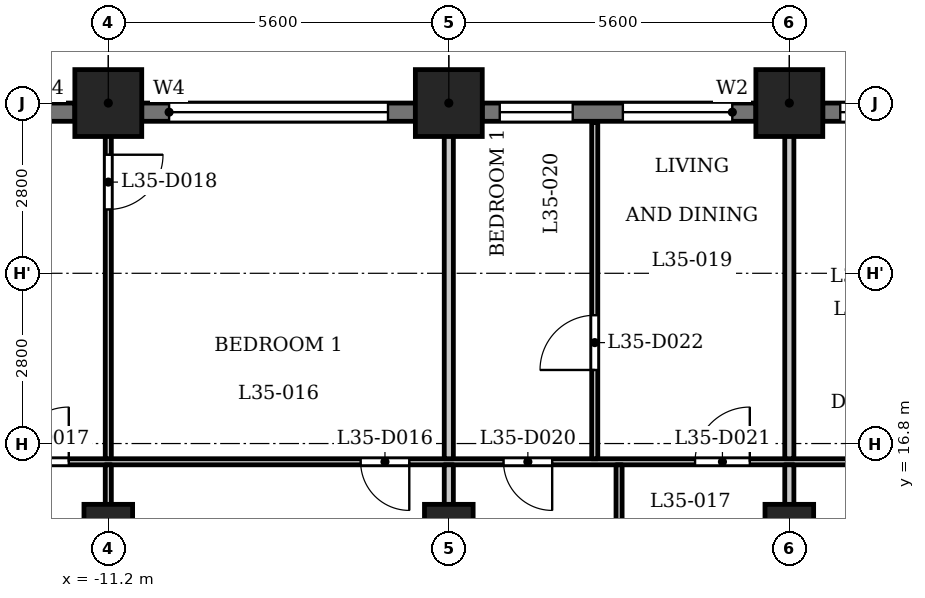
"""IFC4 building model, lengths in metres.
Left out: names, types, materials, properties, quantities, classifications, styles, units other than length and angle.
Written with IfcOpenShell. Run it as: python <this file> out.ifc"""

import sys

from ifc_helpers import new_model, si_unit, direction, frame, frame_2d, origin, origin_2d, place, context, subcontext, project, spatial, rectangle, extrude, element, fill, save


model = new_model("IFC4")
c1 = context("Model", 3, precision=1e-05, world=origin(), true_north=direction((0.0, 1.0)))
c2 = subcontext(c1, "Body", "Model", "MODEL_VIEW")
j1 = project(units=[si_unit("LENGTHUNIT", "METRE"), si_unit("PLANEANGLEUNIT", "RADIAN")], contexts=[c1])
p1 = place(None, origin())
s1 = spatial("IfcSite", under=j1, at=p1, CompositionType="ELEMENT")
p2 = place(p1, origin())
s2 = spatial("IfcBuilding", under=s1, at=p2, CompositionType="ELEMENT")
p3 = place(p2, frame((0.0, 0.0, 139.6)))
s3 = spatial("IfcBuildingStorey", under=s2, at=p3, CompositionType="ELEMENT", Elevation=139.6)
for number, where, z_axis, x_axis in (
    (1, (0.0, 22.4, 0.0), (0.0, 0.0, 1.0), (1.0, 0.0, 0.0)),
    (2, (-5.6, 22.4, 0.0), (0.0, 0.0, 1.0), (1.0, 0.0, 0.0)),
    (3, (-11.2, 22.4, 0.0), (0.0, 0.0, 1.0), (1.0, 0.0, 0.0)),
):
    element("IfcColumn", number, at=place(p3, frame(where, z_axis=z_axis, x_axis=x_axis)), inside=s3, PredefinedType="COLUMN", context=c2, shape_type="SweptSolid", body=[
        extrude(rectangle(XDim=1.1, YDim=1.1, at=origin_2d()), origin(), (0.0, 0.0, 1.0), 3.5),
    ])
for number, where, z_axis, x_axis in (
    (4, (-11.2, 15.4, 0.0), (0.0, 0.0, 1.0), (1.0, 0.0, 0.0)),
    (5, (-5.6, 15.4, 0.0), (0.0, 0.0, 1.0), (1.0, 0.0, 0.0)),
    (6, (0.0, 15.4, 0.0), (0.0, 0.0, 1.0), (1.0, 0.0, 0.0)),
):
    element("IfcColumn", number, at=place(p3, frame(where, z_axis=z_axis, x_axis=x_axis)), inside=s3, PredefinedType="COLUMN", context=c2, shape_type="SweptSolid", body=[
        extrude(rectangle(XDim=0.8, YDim=0.8, at=origin_2d()), origin(), (0.0, 0.0, 1.0), 3.5),
    ])
p4 = place(p3, frame((5.05, 22.25, 0.0), z_axis=(0.0, 0.0, 1.0), x_axis=(-1.0, 0.0, 0.0)))
e7 = element("IfcWall", 7, at=p4, inside=s3, PredefinedType="SOLIDWALL", context=c2, shape_type="SweptSolid", body=[
    extrude(rectangle(XDim=4.5, YDim=0.3, at=frame_2d((2.25, 0.0))), origin(), (0.0, 0.0, 1.0), 2.45),
])
p5 = place(p4, frame((0.387, 0.0, 0.6)))
e8 = element("IfcOpeningElement", 8, at=p5, cuts=e7, PredefinedType="OPENING", context=c2, shape_type="SweptSolid", body=[
    extrude(rectangle(XDim=1.2, YDim=1.55, at=frame_2d((0.6, 0.775))), frame((0.0, 0.16, 0.0), z_axis=(0.0, -1.0, 0.0), x_axis=(1.0, 0.0, 0.0)), (0.0, 0.0, 1.0), 0.32),
])
p6 = place(p4, frame((2.413, 0.0, 0.9)))
e9 = element("IfcOpeningElement", 9, at=p6, cuts=e7, PredefinedType="OPENING", context=c2, shape_type="SweptSolid", body=[
    extrude(rectangle(XDim=1.8, YDim=1.25, at=frame_2d((0.9, 0.625))), frame((0.0, 0.16, 0.0), z_axis=(0.0, -1.0, 0.0), x_axis=(1.0, 0.0, 0.0)), (0.0, 0.0, 1.0), 0.32),
])
p7 = place(p3, frame((-0.55, 22.25, 0.0), z_axis=(0.0, 0.0, 1.0), x_axis=(-1.0, 0.0, 0.0)))
e10 = element("IfcWall", 10, at=p7, inside=s3, PredefinedType="SOLIDWALL", context=c2, shape_type="SweptSolid", body=[
    extrude(rectangle(XDim=4.5, YDim=0.3, at=frame_2d((2.25, 0.0))), origin(), (0.0, 0.0, 1.0), 2.45),
])
p8 = place(p7, frame((0.387, 0.0, 0.9)))
e11 = element("IfcOpeningElement", 11, at=p8, cuts=e10, PredefinedType="OPENING", context=c2, shape_type="SweptSolid", body=[
    extrude(rectangle(XDim=1.8, YDim=1.25, at=frame_2d((0.9, 0.625))), frame((0.0, 0.16, 0.0), z_axis=(0.0, -1.0, 0.0), x_axis=(1.0, 0.0, 0.0)), (0.0, 0.0, 1.0), 0.32),
])
p9 = place(p7, frame((3.012, 0.0, 0.6)))
e12 = element("IfcOpeningElement", 12, at=p9, cuts=e10, PredefinedType="OPENING", context=c2, shape_type="SweptSolid", body=[
    extrude(rectangle(XDim=1.2, YDim=1.55, at=frame_2d((0.6, 0.775))), frame((0.0, 0.16, 0.0), z_axis=(0.0, -1.0, 0.0), x_axis=(1.0, 0.0, 0.0)), (0.0, 0.0, 1.0), 0.32),
])
p10 = place(p3, frame((-6.15, 22.25, 0.0), z_axis=(0.0, 0.0, 1.0), x_axis=(-1.0, 0.0, 0.0)))
e13 = element("IfcWall", 13, at=p10, inside=s3, PredefinedType="SOLIDWALL", context=c2, shape_type="SweptSolid", body=[
    extrude(rectangle(XDim=4.5, YDim=0.3, at=frame_2d((2.25, 0.0))), origin(), (0.0, 0.0, 1.0), 2.45),
])
p11 = place(p10, frame((0.45, 0.0, 1.2)))
e14 = element("IfcOpeningElement", 14, at=p11, cuts=e13, PredefinedType="OPENING", context=c2, shape_type="SweptSolid", body=[
    extrude(rectangle(XDim=3.6, YDim=0.95, at=frame_2d((1.8, 0.475))), frame((0.0, 0.16, 0.0), z_axis=(0.0, -1.0, 0.0), x_axis=(1.0, 0.0, 0.0)), (0.0, 0.0, 1.0), 0.32),
])
p12 = place(p3, frame((-11.75, 22.25, 0.0), z_axis=(0.0, 0.0, 1.0), x_axis=(-1.0, 0.0, 0.0)))
e15 = element("IfcWall", 15, at=p12, inside=s3, PredefinedType="SOLIDWALL", context=c2, shape_type="SweptSolid", body=[
    extrude(rectangle(XDim=4.5, YDim=0.3, at=frame_2d((2.25, 0.0))), origin(), (0.0, 0.0, 1.0), 2.45),
])
p13 = place(p12, frame((0.45, 0.0, 1.2)))
e16 = element("IfcOpeningElement", 16, at=p13, cuts=e15, PredefinedType="OPENING", context=c2, shape_type="SweptSolid", body=[
    extrude(rectangle(XDim=3.6, YDim=0.95, at=frame_2d((1.8, 0.475))), frame((0.0, 0.16, 0.0), z_axis=(0.0, -1.0, 0.0), x_axis=(1.0, 0.0, 0.0)), (0.0, 0.0, 1.0), 0.32),
])
p14 = place(p3, frame((-16.725, 16.5, 0.0), z_axis=(0.0, 0.0, 1.0), x_axis=(1.0, 0.0, 0.0)))
e17 = element("IfcWall", 17, at=p14, inside=s3, PredefinedType="PARTITIONING", context=c2, shape_type="SweptSolid", body=[
    extrude(rectangle(XDim=33.45, YDim=0.1, at=frame_2d((16.725, 0.0))), origin(), (0.0, 0.0, 1.0), 3.2),
])
p15 = place(p14, frame((9.675, 0.0, 0.0)))
e18 = element("IfcOpeningElement", 18, at=p15, cuts=e17, PredefinedType="OPENING", context=c2, shape_type="SweptSolid", body=[
    extrude(rectangle(XDim=0.8, YDim=2.1, at=frame_2d((0.4, 1.05))), frame((0.0, 0.06, 0.0), z_axis=(0.0, -1.0, 0.0), x_axis=(1.0, 0.0, 0.0)), (0.0, 0.0, 1.0), 0.12),
])
p16 = place(p14, frame((3.975, 0.0, 0.0)))
e19 = element("IfcOpeningElement", 19, at=p16, cuts=e17, PredefinedType="OPENING", context=c2, shape_type="SweptSolid", body=[
    extrude(rectangle(XDim=0.9, YDim=2.1, at=frame_2d((0.45, 1.05))), frame((0.0, 0.06, 0.0), z_axis=(0.0, -1.0, 0.0), x_axis=(1.0, 0.0, 0.0)), (0.0, 0.0, 1.0), 0.12),
])
p17 = place(p14, frame((12.025, 0.0, 0.0)))
e20 = element("IfcOpeningElement", 20, at=p17, cuts=e17, PredefinedType="OPENING", context=c2, shape_type="SweptSolid", body=[
    extrude(rectangle(XDim=0.8, YDim=2.1, at=frame_2d((0.4, 1.05))), frame((0.0, 0.06, 0.0), z_axis=(0.0, -1.0, 0.0), x_axis=(1.0, 0.0, 0.0)), (0.0, 0.0, 1.0), 0.12),
])
p18 = place(p14, frame((15.175, 0.0, 0.0)))
e21 = element("IfcOpeningElement", 21, at=p18, cuts=e17, PredefinedType="OPENING", context=c2, shape_type="SweptSolid", body=[
    extrude(rectangle(XDim=0.9, YDim=2.1, at=frame_2d((0.45, 1.05))), frame((0.0, 0.06, 0.0), z_axis=(0.0, -1.0, 0.0), x_axis=(1.0, 0.0, 0.0)), (0.0, 0.0, 1.0), 0.12),
])
p19 = place(p14, frame((20.975, 0.0, 0.0)))
e22 = element("IfcOpeningElement", 22, at=p19, cuts=e17, PredefinedType="OPENING", context=c2, shape_type="SweptSolid", body=[
    extrude(rectangle(XDim=0.8, YDim=2.1, at=frame_2d((0.4, 1.05))), frame((0.0, 0.06, 0.0), z_axis=(0.0, -1.0, 0.0), x_axis=(1.0, 0.0, 0.0)), (0.0, 0.0, 1.0), 0.12),
])
p20 = place(p14, frame((18.175, 0.0, 0.0)))
e23 = element("IfcOpeningElement", 23, at=p20, cuts=e17, PredefinedType="OPENING", context=c2, shape_type="SweptSolid", body=[
    extrude(rectangle(XDim=0.9, YDim=2.1, at=frame_2d((0.45, 1.05))), frame((0.0, 0.06, 0.0), z_axis=(0.0, -1.0, 0.0), x_axis=(1.0, 0.0, 0.0)), (0.0, 0.0, 1.0), 0.12),
])
p21 = place(p14, frame((23.725, 0.0, 0.0)))
e24 = element("IfcOpeningElement", 24, at=p21, cuts=e17, PredefinedType="OPENING", context=c2, shape_type="SweptSolid", body=[
    extrude(rectangle(XDim=0.8, YDim=2.1, at=frame_2d((0.4, 1.05))), frame((0.0, 0.06, 0.0), z_axis=(0.0, -1.0, 0.0), x_axis=(1.0, 0.0, 0.0)), (0.0, 0.0, 1.0), 0.12),
])
p22 = place(p14, frame((26.125, 0.0, 0.0)))
e25 = element("IfcOpeningElement", 25, at=p22, cuts=e17, PredefinedType="OPENING", context=c2, shape_type="SweptSolid", body=[
    extrude(rectangle(XDim=0.9, YDim=2.1, at=frame_2d((0.45, 1.05))), frame((0.0, 0.06, 0.0), z_axis=(0.0, -1.0, 0.0), x_axis=(1.0, 0.0, 0.0)), (0.0, 0.0, 1.0), 0.12),
])
p23 = place(p14, frame((32.125, 0.0, 0.0)))
e26 = element("IfcOpeningElement", 26, at=p23, cuts=e17, PredefinedType="OPENING", context=c2, shape_type="SweptSolid", body=[
    extrude(rectangle(XDim=0.8, YDim=2.1, at=frame_2d((0.4, 1.05))), frame((0.0, 0.06, 0.0), z_axis=(0.0, -1.0, 0.0), x_axis=(1.0, 0.0, 0.0)), (0.0, 0.0, 1.0), 0.12),
])
p24 = place(p14, frame((28.975, 0.0, 0.0)))
e27 = element("IfcOpeningElement", 27, at=p24, cuts=e17, PredefinedType="OPENING", context=c2, shape_type="SweptSolid", body=[
    extrude(rectangle(XDim=0.9, YDim=2.1, at=frame_2d((0.45, 1.05))), frame((0.0, 0.06, 0.0), z_axis=(0.0, -1.0, 0.0), x_axis=(1.0, 0.0, 0.0)), (0.0, 0.0, 1.0), 0.12),
])
p25 = place(p3, frame((-11.2, 13.275, 0.0), z_axis=(0.0, 0.0, 1.0), x_axis=(0.0, 1.0, 0.0)))
e28 = element("IfcWall", 28, at=p25, inside=s3, PredefinedType="PARTITIONING", context=c2, shape_type="SweptSolid", body=[
    extrude(rectangle(XDim=3.175, YDim=0.1, at=frame_2d((1.587, 0.0))), origin(), (0.0, 0.0, 1.0), 3.2),
])
p26 = place(p3, frame((-11.2, 16.55, 0.0), z_axis=(0.0, 0.0, 1.0), x_axis=(0.0, 1.0, 0.0)))
e29 = element("IfcWall", 29, at=p26, inside=s3, PredefinedType="PARTITIONING", context=c2, shape_type="SweptSolid", body=[
    extrude(rectangle(XDim=6.38, YDim=0.1, at=frame_2d((3.19, 0.0))), origin(), (0.0, 0.0, 1.0), 3.2),
])
p27 = place(p26, frame((4.1, 0.0, 0.0)))
e30 = element("IfcOpeningElement", 30, at=p27, cuts=e29, PredefinedType="OPENING", context=c2, shape_type="SweptSolid", body=[
    extrude(rectangle(XDim=0.9, YDim=2.1, at=frame_2d((0.45, 1.05))), frame((0.0, 0.06, 0.0), z_axis=(0.0, -1.0, 0.0), x_axis=(1.0, 0.0, 0.0)), (0.0, 0.0, 1.0), 0.12),
])
p28 = place(p3, frame((-5.6, 13.275, 0.0), z_axis=(0.0, 0.0, 1.0), x_axis=(0.0, 1.0, 0.0)))
e31 = element("IfcWall", 31, at=p28, inside=s3, PredefinedType="PARTITIONING", context=c2, shape_type="SweptSolid", body=[
    extrude(rectangle(XDim=3.175, YDim=0.15, at=frame_2d((1.587, 0.0))), origin(), (0.0, 0.0, 1.0), 3.2),
])
p29 = place(p3, frame((-5.6, 16.55, 0.0), z_axis=(0.0, 0.0, 1.0), x_axis=(0.0, 1.0, 0.0)))
e32 = element("IfcWall", 32, at=p29, inside=s3, PredefinedType="PARTITIONING", context=c2, shape_type="SweptSolid", body=[
    extrude(rectangle(XDim=6.38, YDim=0.15, at=frame_2d((3.19, 0.0))), origin(), (0.0, 0.0, 1.0), 3.2),
])
p30 = place(p3, frame((-3.2, 16.55, 0.0), z_axis=(0.0, 0.0, 1.0), x_axis=(0.0, 1.0, 0.0)))
e33 = element("IfcWall", 33, at=p30, inside=s3, PredefinedType="PARTITIONING", context=c2, shape_type="SweptSolid", body=[
    extrude(rectangle(XDim=5.53, YDim=0.1, at=frame_2d((2.765, 0.0))), origin(), (0.0, 0.0, 1.0), 3.2),
])
p31 = place(p30, frame((1.46, 0.0, 0.0)))
e34 = element("IfcOpeningElement", 34, at=p31, cuts=e33, PredefinedType="OPENING", context=c2, shape_type="SweptSolid", body=[
    extrude(rectangle(XDim=0.9, YDim=2.1, at=frame_2d((0.45, 1.05))), frame((0.0, 0.06, 0.0), z_axis=(0.0, -1.0, 0.0), x_axis=(1.0, 0.0, 0.0)), (0.0, 0.0, 1.0), 0.12),
])
p32 = place(p3, frame((-2.8, 13.275, 0.0), z_axis=(0.0, 0.0, 1.0), x_axis=(0.0, 1.0, 0.0)))
e35 = element("IfcWall", 35, at=p32, inside=s3, PredefinedType="PARTITIONING", context=c2, shape_type="SweptSolid", body=[
    extrude(rectangle(XDim=3.175, YDim=0.1, at=frame_2d((1.587, 0.0))), origin(), (0.0, 0.0, 1.0), 3.2),
])
p33 = place(p3, frame((0.0, 13.275, 0.0), z_axis=(0.0, 0.0, 1.0), x_axis=(0.0, 1.0, 0.0)))
e36 = element("IfcWall", 36, at=p33, inside=s3, PredefinedType="PARTITIONING", context=c2, shape_type="SweptSolid", body=[
    extrude(rectangle(XDim=3.175, YDim=0.15, at=frame_2d((1.587, 0.0))), origin(), (0.0, 0.0, 1.0), 3.2),
])
p34 = place(p3, frame((0.0, 16.55, 0.0), z_axis=(0.0, 0.0, 1.0), x_axis=(0.0, 1.0, 0.0)))
e37 = element("IfcWall", 37, at=p34, inside=s3, PredefinedType="PARTITIONING", context=c2, shape_type="SweptSolid", body=[
    extrude(rectangle(XDim=6.38, YDim=0.15, at=frame_2d((3.19, 0.0))), origin(), (0.0, 0.0, 1.0), 3.2),
])
p35 = place(p15, origin())
e38 = element("IfcDoor", 38, at=p35, inside=s3, OperationType="SINGLE_SWING_RIGHT", PredefinedType="DOOR", context=c2, shape_type="SweptSolid", body=[
    extrude(rectangle(XDim=0.8, YDim=2.1, at=frame_2d((0.4, 1.05))), frame((0.0, 0.025, 0.0), z_axis=(0.0, -1.0, 0.0), x_axis=(1.0, 0.0, 0.0)), (0.0, 0.0, 1.0), 0.05),
])
fill(e18, e38)
p36 = place(p16, origin())
e39 = element("IfcDoor", 39, at=p36, inside=s3, OperationType="SINGLE_SWING_LEFT", PredefinedType="DOOR", context=c2, shape_type="SweptSolid", body=[
    extrude(rectangle(XDim=0.9, YDim=2.1, at=frame_2d((0.45, 1.05))), frame((0.0, 0.025, 0.0), z_axis=(0.0, -1.0, 0.0), x_axis=(1.0, 0.0, 0.0)), (0.0, 0.0, 1.0), 0.05),
])
fill(e19, e39)
p37 = place(p27, origin())
e40 = element("IfcDoor", 40, at=p37, inside=s3, OperationType="SINGLE_SWING_RIGHT", PredefinedType="DOOR", context=c2, shape_type="SweptSolid", body=[
    extrude(rectangle(XDim=0.9, YDim=2.1, at=frame_2d((0.45, 1.05))), frame((0.0, 0.025, 0.0), z_axis=(0.0, -1.0, 0.0), x_axis=(1.0, 0.0, 0.0)), (0.0, 0.0, 1.0), 0.05),
])
fill(e30, e40)
p38 = place(p17, origin())
e41 = element("IfcDoor", 41, at=p38, inside=s3, OperationType="SINGLE_SWING_RIGHT", PredefinedType="DOOR", context=c2, shape_type="SweptSolid", body=[
    extrude(rectangle(XDim=0.8, YDim=2.1, at=frame_2d((0.4, 1.05))), frame((0.0, 0.025, 0.0), z_axis=(0.0, -1.0, 0.0), x_axis=(1.0, 0.0, 0.0)), (0.0, 0.0, 1.0), 0.05),
])
fill(e20, e41)
p39 = place(p18, origin())
e42 = element("IfcDoor", 42, at=p39, inside=s3, OperationType="SINGLE_SWING_LEFT", PredefinedType="DOOR", context=c2, shape_type="SweptSolid", body=[
    extrude(rectangle(XDim=0.9, YDim=2.1, at=frame_2d((0.45, 1.05))), frame((0.0, 0.025, 0.0), z_axis=(0.0, -1.0, 0.0), x_axis=(1.0, 0.0, 0.0)), (0.0, 0.0, 1.0), 0.05),
])
fill(e21, e42)
p40 = place(p31, origin())
e43 = element("IfcDoor", 43, at=p40, inside=s3, OperationType="SINGLE_SWING_RIGHT", PredefinedType="DOOR", context=c2, shape_type="SweptSolid", body=[
    extrude(rectangle(XDim=0.9, YDim=2.1, at=frame_2d((0.45, 1.05))), frame((0.0, 0.025, 0.0), z_axis=(0.0, -1.0, 0.0), x_axis=(1.0, 0.0, 0.0)), (0.0, 0.0, 1.0), 0.05),
])
fill(e34, e43)
p41 = place(p6, origin())
e44 = element("IfcWindow", 44, at=p41, inside=s3, PartitioningType="SINGLE_PANEL", PredefinedType="WINDOW", context=c2, shape_type="SweptSolid", body=[
    extrude(rectangle(XDim=1.8, YDim=1.25, at=frame_2d((0.9, 0.625))), frame((0.0, 0.03, 0.0), z_axis=(0.0, -1.0, 0.0), x_axis=(1.0, 0.0, 0.0)), (0.0, 0.0, 1.0), 0.06),
])
fill(e9, e44)
p42 = place(p8, origin())
e45 = element("IfcWindow", 45, at=p42, inside=s3, PartitioningType="SINGLE_PANEL", PredefinedType="WINDOW", context=c2, shape_type="SweptSolid", body=[
    extrude(rectangle(XDim=1.8, YDim=1.25, at=frame_2d((0.9, 0.625))), frame((0.0, 0.03, 0.0), z_axis=(0.0, -1.0, 0.0), x_axis=(1.0, 0.0, 0.0)), (0.0, 0.0, 1.0), 0.06),
])
fill(e11, e45)
p43 = place(p9, origin())
e46 = element("IfcWindow", 46, at=p43, inside=s3, PartitioningType="SINGLE_PANEL", PredefinedType="WINDOW", context=c2, shape_type="SweptSolid", body=[
    extrude(rectangle(XDim=1.2, YDim=1.55, at=frame_2d((0.6, 0.775))), frame((0.0, 0.03, 0.0), z_axis=(0.0, -1.0, 0.0), x_axis=(1.0, 0.0, 0.0)), (0.0, 0.0, 1.0), 0.06),
])
fill(e12, e46)
p44 = place(p11, origin())
e47 = element("IfcWindow", 47, at=p44, inside=s3, PartitioningType="SINGLE_PANEL", PredefinedType="WINDOW", context=c2, shape_type="SweptSolid", body=[
    extrude(rectangle(XDim=3.6, YDim=0.95, at=frame_2d((1.8, 0.475))), frame((0.0, 0.03, 0.0), z_axis=(0.0, -1.0, 0.0), x_axis=(1.0, 0.0, 0.0)), (0.0, 0.0, 1.0), 0.06),
])
fill(e14, e47)
save(model, sys.argv[1])
